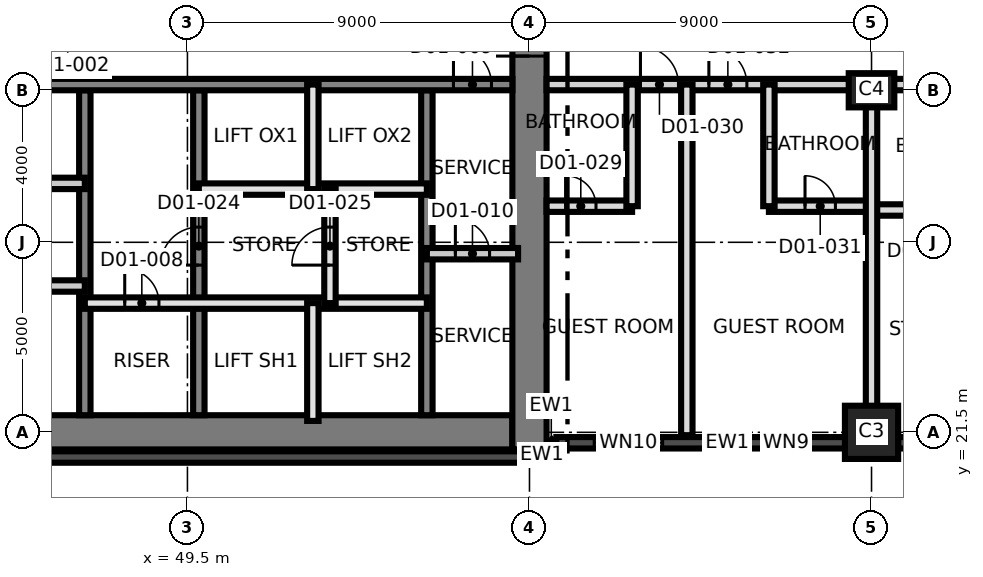
"""IFC4 building model, lengths in metres.
Left out: names, types, materials, properties, quantities, classifications, styles, units other than length and angle.
Written with IfcOpenShell. Run it as: python <this file> out.ifc"""

import sys

from ifc_helpers import new_model, si_unit, direction, frame, frame_2d, origin, origin_2d, place, context, subcontext, project, spatial, rectangle, extrude, element, fill, save


model = new_model("IFC4")
c1 = context("Model", 3, precision=1e-05, world=origin(), true_north=direction((0.0, 1.0)))
c2 = subcontext(c1, "Body", "Model", "MODEL_VIEW")
j1 = project(units=[si_unit("LENGTHUNIT", "METRE"), si_unit("PLANEANGLEUNIT", "RADIAN")], contexts=[c1])
p1 = place(None, origin())
s1 = spatial("IfcSite", under=j1, at=p1, CompositionType="ELEMENT")
p2 = place(p1, origin())
s2 = spatial("IfcBuilding", under=s1, at=p2, CompositionType="ELEMENT")
p3 = place(p2, frame((0.0, 0.0, 33.5)))
s3 = spatial("IfcBuildingStorey", under=s2, at=p3, CompositionType="ELEMENT", Elevation=33.5)
p4 = place(p3, frame((31.05, 21.5, 0.0), z_axis=(0.0, 0.0, 1.0), x_axis=(1.0, 0.0, 0.0)))
e1 = element("IfcWall", 1, at=p4, inside=s3, PredefinedType="SHEAR", context=c2, shape_type="SweptSolid", body=[
    extrude(rectangle(XDim=27.0, YDim=0.9, at=frame_2d((13.5, 0.0))), origin(), (0.0, 0.0, 1.0), 3.7),
])
p5 = place(p3, frame((58.5, 21.05, 0.0), z_axis=(0.0, 0.0, 1.0), x_axis=(0.0, 1.0, 0.0)))
e2 = element("IfcWall", 2, at=p5, inside=s3, PredefinedType="SHEAR", context=c2, shape_type="SweptSolid", body=[
    extrude(rectangle(XDim=18.9, YDim=0.9, at=frame_2d((9.45, 0.0))), origin(), (0.0, 0.0, 1.0), 3.7),
])
p6 = place(p5, frame((10.35, 0.0, 0.0)))
e3 = element("IfcOpeningElement", 3, at=p6, cuts=e2, PredefinedType="OPENING", context=c2, shape_type="SweptSolid", body=[
    extrude(rectangle(XDim=1.2, YDim=2.1, at=frame_2d((0.6, 1.05))), frame((0.0, 0.46, 0.0), z_axis=(0.0, -1.0, 0.0), x_axis=(1.0, 0.0, 0.0)), (0.0, 0.0, 1.0), 0.92),
])
p7 = place(p3, frame((46.8, 21.95, 0.0), z_axis=(0.0, 0.0, 1.0), x_axis=(0.0, 1.0, 0.0)))
e4 = element("IfcWall", 4, at=p7, inside=s3, PredefinedType="SHEAR", context=c2, shape_type="SweptSolid", body=[
    extrude(rectangle(XDim=8.55, YDim=0.3, at=frame_2d((4.275, 0.0))), origin(), (0.0, 0.0, 1.0), 3.7),
])
p8 = place(p3, frame((49.8, 21.95, 0.0), z_axis=(0.0, 0.0, 1.0), x_axis=(0.0, 1.0, 0.0)))
e5 = element("IfcWall", 5, at=p8, inside=s3, PredefinedType="SHEAR", context=c2, shape_type="SweptSolid", body=[
    extrude(rectangle(XDim=8.55, YDim=0.3, at=frame_2d((4.275, 0.0))), origin(), (0.0, 0.0, 1.0), 3.7),
])
p9 = place(p8, frame((3.95, 0.0, 0.0)))
e6 = element("IfcOpeningElement", 6, at=p9, cuts=e5, PredefinedType="OPENING", context=c2, shape_type="SweptSolid", body=[
    extrude(rectangle(XDim=1.0, YDim=2.1, at=frame_2d((0.5, 1.05))), frame((0.0, 0.16, 0.0), z_axis=(0.0, -1.0, 0.0), x_axis=(1.0, 0.0, 0.0)), (0.0, 0.0, 1.0), 0.32),
])
p10 = place(p3, frame((55.8, 21.95, 0.0), z_axis=(0.0, 0.0, 1.0), x_axis=(0.0, 1.0, 0.0)))
e7 = element("IfcWall", 7, at=p10, inside=s3, PredefinedType="SHEAR", context=c2, shape_type="SweptSolid", body=[
    extrude(rectangle(XDim=8.55, YDim=0.3, at=frame_2d((4.275, 0.0))), origin(), (0.0, 0.0, 1.0), 3.7),
])
p11 = place(p3, frame((31.95, 30.65, 0.0), z_axis=(0.0, 0.0, 1.0), x_axis=(1.0, 0.0, 0.0)))
e8 = element("IfcWall", 8, at=p11, inside=s3, PredefinedType="SHEAR", context=c2, shape_type="SweptSolid", body=[
    extrude(rectangle(XDim=26.1, YDim=0.3, at=frame_2d((13.05, 0.0))), origin(), (0.0, 0.0, 1.0), 3.7),
])
p12 = place(p11, frame((24.55, 0.0, 0.0)))
e9 = element("IfcOpeningElement", 9, at=p12, cuts=e8, PredefinedType="OPENING", context=c2, shape_type="SweptSolid", body=[
    extrude(rectangle(XDim=1.0, YDim=2.1, at=frame_2d((0.5, 1.05))), frame((0.0, 0.16, 0.0), z_axis=(0.0, -1.0, 0.0), x_axis=(1.0, 0.0, 0.0)), (0.0, 0.0, 1.0), 0.32),
])
p13 = place(p11, frame((11.35, 0.0, 0.0)))
e10 = element("IfcOpeningElement", 10, at=p13, cuts=e8, PredefinedType="OPENING", context=c2, shape_type="SweptSolid", body=[
    extrude(rectangle(XDim=1.0, YDim=2.1, at=frame_2d((0.5, 1.05))), frame((0.0, 0.16, 0.0), z_axis=(0.0, -1.0, 0.0), x_axis=(1.0, 0.0, 0.0)), (0.0, 0.0, 1.0), 0.32),
])
p14 = place(p3, frame((67.5, 21.5, 0.0), z_axis=(0.0, 0.0, 1.0), x_axis=(1.0, 0.0, 0.0)))
e11 = element("IfcColumn", 11, at=p14, inside=s3, PredefinedType="COLUMN", context=c2, shape_type="SweptSolid", body=[
    extrude(rectangle(XDim=1.4, YDim=1.4, at=origin_2d()), origin(), (0.0, 0.0, 1.0), 3.7),
])
p15 = place(p3, frame((67.5, 30.5, 0.0), z_axis=(0.0, 0.0, 1.0), x_axis=(1.0, 0.0, 0.0)))
e12 = element("IfcColumn", 12, at=p15, inside=s3, PredefinedType="COLUMN", context=c2, shape_type="SweptSolid", body=[
    extrude(rectangle(XDim=1.2, YDim=0.9, at=origin_2d()), origin(), (0.0, 0.0, 1.0), 3.7),
])
p16 = place(p3, frame((31.36, 20.85, 0.0), z_axis=(0.0, 0.0, 1.0), x_axis=(1.0, 0.0, 0.0)))
e13 = element("IfcWall", 13, at=p16, inside=s3, PredefinedType="SOLIDWALL", context=c2, shape_type="SweptSolid", body=[
    extrude(rectangle(XDim=27.281, YDim=0.3, at=frame_2d((13.64, 0.0))), origin(), (0.0, 0.0, 1.0), 3.4),
])
p17 = place(p3, frame((58.698, 20.861, 0.0), z_axis=(0.0, 0.0, 1.0), x_axis=(0.923757413239, 0.38297812142, 0.0)))
e14 = element("IfcWall", 14, at=p17, inside=s3, PredefinedType="SOLIDWALL", context=c2, shape_type="SweptSolid", body=[
    extrude(rectangle(XDim=0.275, YDim=0.3, at=frame_2d((0.138, 0.0))), origin(), (0.0, 0.0, 1.0), 3.4),
])
p18 = place(p3, frame((58.952, 20.967, 0.0), z_axis=(0.0, 0.0, 1.0), x_axis=(0.702144810536, 0.712034174065, 0.0)))
e15 = element("IfcWall", 15, at=p18, inside=s3, PredefinedType="SOLIDWALL", context=c2, shape_type="SweptSolid", body=[
    extrude(rectangle(XDim=0.346, YDim=0.3, at=frame_2d((0.173, 0.0))), origin(), (0.0, 0.0, 1.0), 3.4),
])
p19 = place(p3, frame((59.207, 21.225, 0.0), z_axis=(0.0, 0.0, 1.0), x_axis=(1.0, 0.0, 0.0)))
e16 = element("IfcWall", 16, at=p19, inside=s3, PredefinedType="SOLIDWALL", context=c2, shape_type="SweptSolid", body=[
    extrude(rectangle(XDim=8.993, YDim=0.3, at=frame_2d((4.497, 0.0))), origin(), (0.0, 0.0, 1.0), 3.4),
])
p20 = place(p19, frame((0.997, 0.0, 0.3)))
e17 = element("IfcOpeningElement", 17, at=p20, cuts=e16, PredefinedType="OPENING", context=c2, shape_type="SweptSolid", body=[
    extrude(rectangle(XDim=1.8, YDim=2.4, at=frame_2d((0.9, 1.2))), frame((0.0, 0.16, 0.0), z_axis=(0.0, -1.0, 0.0), x_axis=(1.0, 0.0, 0.0)), (0.0, 0.0, 1.0), 0.32),
])
p21 = place(p19, frame((5.443, 0.0, 0.9)))
e18 = element("IfcOpeningElement", 18, at=p21, cuts=e16, PredefinedType="OPENING", context=c2, shape_type="SweptSolid", body=[
    extrude(rectangle(XDim=1.2, YDim=1.5, at=frame_2d((0.6, 0.75))), frame((0.0, 0.16, 0.0), z_axis=(0.0, -1.0, 0.0), x_axis=(1.0, 0.0, 0.0)), (0.0, 0.0, 1.0), 0.32),
])
p22 = place(p3, frame((68.2, 21.225, 0.0), z_axis=(0.0, 0.0, 1.0), x_axis=(1.0, 0.0, 0.0)))
e19 = element("IfcWall", 19, at=p22, inside=s3, PredefinedType="SOLIDWALL", context=c2, shape_type="SweptSolid", body=[
    extrude(rectangle(XDim=7.6, YDim=0.3, at=frame_2d((3.8, 0.0))), origin(), (0.0, 0.0, 1.0), 2.7),
])
p23 = place(p22, frame((0.95, 0.0, 0.9)))
e20 = element("IfcOpeningElement", 20, at=p23, cuts=e19, PredefinedType="OPENING", context=c2, shape_type="SweptSolid", body=[
    extrude(rectangle(XDim=1.2, YDim=1.5, at=frame_2d((0.6, 0.75))), frame((0.0, 0.16, 0.0), z_axis=(0.0, -1.0, 0.0), x_axis=(1.0, 0.0, 0.0)), (0.0, 0.0, 1.0), 0.32),
])
p24 = place(p22, frame((5.45, 0.0, 0.9)))
e21 = element("IfcOpeningElement", 21, at=p24, cuts=e19, PredefinedType="OPENING", context=c2, shape_type="SweptSolid", body=[
    extrude(rectangle(XDim=1.2, YDim=1.5, at=frame_2d((0.6, 0.75))), frame((0.0, 0.16, 0.0), z_axis=(0.0, -1.0, 0.0), x_axis=(1.0, 0.0, 0.0)), (0.0, 0.0, 1.0), 0.32),
])
p25 = place(p3, frame((46.8, 24.9, 0.0), z_axis=(0.0, 0.0, 1.0), x_axis=(1.0, 0.0, 0.0)))
e22 = element("IfcWall", 22, at=p25, inside=s3, PredefinedType="SOLIDWALL", context=c2, shape_type="SweptSolid", body=[
    extrude(rectangle(XDim=9.0, YDim=0.3, at=frame_2d((4.5, 0.0))), origin(), (0.0, 0.0, 1.0), 3.4),
])
p26 = place(p25, frame((1.05, 0.0, 0.0)))
e23 = element("IfcOpeningElement", 23, at=p26, cuts=e22, PredefinedType="OPENING", context=c2, shape_type="SweptSolid", body=[
    extrude(rectangle(XDim=0.9, YDim=2.1, at=frame_2d((0.45, 1.05))), frame((0.0, 0.16, 0.0), z_axis=(0.0, -1.0, 0.0), x_axis=(1.0, 0.0, 0.0)), (0.0, 0.0, 1.0), 0.32),
])
p27 = place(p3, frame((40.8, 25.35, 0.0), z_axis=(0.0, 0.0, 1.0), x_axis=(1.0, 0.0, 0.0)))
e24 = element("IfcWall", 24, at=p27, inside=s3, PredefinedType="PARTITIONING", context=c2, shape_type="SweptSolid", body=[
    extrude(rectangle(XDim=6.0, YDim=0.3, at=frame_2d((3.0, 0.0))), origin(), (0.0, 0.0, 1.0), 3.4),
])
p28 = place(p27, frame((2.5, 0.0, 0.0)))
e25 = element("IfcOpeningElement", 25, at=p28, cuts=e24, PredefinedType="OPENING", context=c2, shape_type="SweptSolid", body=[
    extrude(rectangle(XDim=1.0, YDim=2.1, at=frame_2d((0.5, 1.05))), frame((0.0, 0.16, 0.0), z_axis=(0.0, -1.0, 0.0), x_axis=(1.0, 0.0, 0.0)), (0.0, 0.0, 1.0), 0.32),
])
p29 = place(p3, frame((55.8, 26.2, 0.0), z_axis=(0.0, 0.0, 1.0), x_axis=(1.0, 0.0, 0.0)))
e26 = element("IfcWall", 26, at=p29, inside=s3, PredefinedType="PARTITIONING", context=c2, shape_type="SweptSolid", body=[
    extrude(rectangle(XDim=2.4, YDim=0.3, at=frame_2d((1.2, 0.0))), origin(), (0.0, 0.0, 1.0), 3.4),
])
p30 = place(p29, frame((0.75, 0.0, 0.0)))
e27 = element("IfcOpeningElement", 27, at=p30, cuts=e26, PredefinedType="OPENING", context=c2, shape_type="SweptSolid", body=[
    extrude(rectangle(XDim=0.9, YDim=2.1, at=frame_2d((0.45, 1.05))), frame((0.0, 0.16, 0.0), z_axis=(0.0, -1.0, 0.0), x_axis=(1.0, 0.0, 0.0)), (0.0, 0.0, 1.0), 0.32),
])
p31 = place(p3, frame((49.8, 27.9, 0.0), z_axis=(0.0, 0.0, 1.0), x_axis=(1.0, 0.0, 0.0)))
e28 = element("IfcWall", 28, at=p31, inside=s3, PredefinedType="SOLIDWALL", context=c2, shape_type="SweptSolid", body=[
    extrude(rectangle(XDim=6.0, YDim=0.3, at=frame_2d((3.0, 0.0))), origin(), (0.0, 0.0, 1.0), 3.4),
])
p32 = place(p3, frame((40.8, 28.05, 0.0), z_axis=(0.0, 0.0, 1.0), x_axis=(1.0, 0.0, 0.0)))
e29 = element("IfcWall", 29, at=p32, inside=s3, PredefinedType="PARTITIONING", context=c2, shape_type="SweptSolid", body=[
    extrude(rectangle(XDim=6.0, YDim=0.3, at=frame_2d((3.0, 0.0))), origin(), (0.0, 0.0, 1.0), 3.4),
])
p33 = place(p3, frame((52.8, 21.8, 0.0), z_axis=(0.0, 0.0, 1.0), x_axis=(0.0, 1.0, 0.0)))
e30 = element("IfcWall", 30, at=p33, inside=s3, PredefinedType="SOLIDWALL", context=c2, shape_type="SweptSolid", body=[
    extrude(rectangle(XDim=3.1, YDim=0.3, at=frame_2d((1.55, 0.0))), origin(), (0.0, 0.0, 1.0), 3.4),
])
p34 = place(p3, frame((52.8, 27.9, 0.0), z_axis=(0.0, 0.0, 1.0), x_axis=(0.0, 1.0, 0.0)))
e31 = element("IfcWall", 31, at=p34, inside=s3, PredefinedType="SOLIDWALL", context=c2, shape_type="SweptSolid", body=[
    extrude(rectangle(XDim=2.75, YDim=0.3, at=frame_2d((1.375, 0.0))), origin(), (0.0, 0.0, 1.0), 3.4),
])
p35 = place(p3, frame((53.25, 24.9, 0.0), z_axis=(0.0, 0.0, 1.0), x_axis=(0.0, 1.0, 0.0)))
e32 = element("IfcWall", 32, at=p35, inside=s3, PredefinedType="SOLIDWALL", context=c2, shape_type="SweptSolid", body=[
    extrude(rectangle(XDim=3.0, YDim=0.3, at=frame_2d((1.5, 0.0))), origin(), (0.0, 0.0, 1.0), 3.4),
])
p36 = place(p35, frame((1.0, 0.0, 0.0)))
e33 = element("IfcOpeningElement", 33, at=p36, cuts=e32, PredefinedType="OPENING", context=c2, shape_type="SweptSolid", body=[
    extrude(rectangle(XDim=1.0, YDim=2.1, at=frame_2d((0.5, 1.05))), frame((0.0, 0.16, 0.0), z_axis=(0.0, -1.0, 0.0), x_axis=(1.0, 0.0, 0.0)), (0.0, 0.0, 1.0), 0.32),
])
p37 = place(p3, frame((67.5, 27.35, 0.0), z_axis=(0.0, 0.0, 1.0), x_axis=(1.0, 0.0, 0.0)))
e34 = element("IfcWall", 34, at=p37, inside=s3, PredefinedType="PARTITIONING", context=c2, shape_type="SweptSolid", body=[
    extrude(rectangle(XDim=3.0, YDim=0.3, at=frame_2d((1.5, 0.0))), origin(), (0.0, 0.0, 1.0), 3.4),
])
p38 = place(p37, frame((1.1, 0.0, 0.0)))
e35 = element("IfcOpeningElement", 35, at=p38, cuts=e34, PredefinedType="OPENING", context=c2, shape_type="SweptSolid", body=[
    extrude(rectangle(XDim=0.8, YDim=2.1, at=frame_2d((0.4, 1.05))), frame((0.0, 0.16, 0.0), z_axis=(0.0, -1.0, 0.0), x_axis=(1.0, 0.0, 0.0)), (0.0, 0.0, 1.0), 0.32),
])
p39 = place(p3, frame((58.95, 27.45, 0.0), z_axis=(0.0, 0.0, 1.0), x_axis=(1.0, 0.0, 0.0)))
e36 = element("IfcWall", 36, at=p39, inside=s3, PredefinedType="PARTITIONING", context=c2, shape_type="SweptSolid", body=[
    extrude(rectangle(XDim=2.25, YDim=0.3, at=frame_2d((1.125, 0.0))), origin(), (0.0, 0.0, 1.0), 3.4),
])
p40 = place(p39, frame((0.5, 0.0, 0.0)))
e37 = element("IfcOpeningElement", 37, at=p40, cuts=e36, PredefinedType="OPENING", context=c2, shape_type="SweptSolid", body=[
    extrude(rectangle(XDim=0.8, YDim=2.1, at=frame_2d((0.4, 1.05))), frame((0.0, 0.16, 0.0), z_axis=(0.0, -1.0, 0.0), x_axis=(1.0, 0.0, 0.0)), (0.0, 0.0, 1.0), 0.32),
])
p41 = place(p3, frame((64.8, 27.45, 0.0), z_axis=(0.0, 0.0, 1.0), x_axis=(1.0, 0.0, 0.0)))
e38 = element("IfcWall", 38, at=p41, inside=s3, PredefinedType="PARTITIONING", context=c2, shape_type="SweptSolid", body=[
    extrude(rectangle(XDim=2.7, YDim=0.3, at=frame_2d((1.35, 0.0))), origin(), (0.0, 0.0, 1.0), 3.4),
])
p42 = place(p41, frame((0.95, 0.0, 0.0)))
e39 = element("IfcOpeningElement", 39, at=p42, cuts=e38, PredefinedType="OPENING", context=c2, shape_type="SweptSolid", body=[
    extrude(rectangle(XDim=0.8, YDim=2.1, at=frame_2d((0.4, 1.05))), frame((0.0, 0.16, 0.0), z_axis=(0.0, -1.0, 0.0), x_axis=(1.0, 0.0, 0.0)), (0.0, 0.0, 1.0), 0.32),
])
p43 = place(p3, frame((58.95, 30.65, 0.0), z_axis=(0.0, 0.0, 1.0), x_axis=(1.0, 0.0, 0.0)))
e40 = element("IfcWall", 40, at=p43, inside=s3, PredefinedType="PARTITIONING", context=c2, shape_type="SweptSolid", body=[
    extrude(rectangle(XDim=26.38, YDim=0.3, at=frame_2d((13.19, 0.0))), origin(), (0.0, 0.0, 1.0), 3.4),
])
p44 = place(p43, frame((2.47, 0.0, 0.0)))
e41 = element("IfcOpeningElement", 41, at=p44, cuts=e40, PredefinedType="OPENING", context=c2, shape_type="SweptSolid", body=[
    extrude(rectangle(XDim=1.0, YDim=2.1, at=frame_2d((0.5, 1.05))), frame((0.0, 0.16, 0.0), z_axis=(0.0, -1.0, 0.0), x_axis=(1.0, 0.0, 0.0)), (0.0, 0.0, 1.0), 0.32),
])
p45 = place(p43, frame((4.27, 0.0, 0.0)))
e42 = element("IfcOpeningElement", 42, at=p45, cuts=e40, PredefinedType="OPENING", context=c2, shape_type="SweptSolid", body=[
    extrude(rectangle(XDim=1.0, YDim=2.1, at=frame_2d((0.5, 1.05))), frame((0.0, 0.16, 0.0), z_axis=(0.0, -1.0, 0.0), x_axis=(1.0, 0.0, 0.0)), (0.0, 0.0, 1.0), 0.32),
])
p46 = place(p43, frame((11.8, 0.0, 0.0)))
e43 = element("IfcOpeningElement", 43, at=p46, cuts=e40, PredefinedType="OPENING", context=c2, shape_type="SweptSolid", body=[
    extrude(rectangle(XDim=1.0, YDim=2.4, at=frame_2d((0.5, 1.2))), frame((0.0, 0.16, 0.0), z_axis=(0.0, -1.0, 0.0), x_axis=(1.0, 0.0, 0.0)), (0.0, 0.0, 1.0), 0.32),
])
p47 = place(p43, frame((13.3, 0.0, 0.0)))
e44 = element("IfcOpeningElement", 44, at=p47, cuts=e40, PredefinedType="OPENING", context=c2, shape_type="SweptSolid", body=[
    extrude(rectangle(XDim=1.0, YDim=2.4, at=frame_2d((0.5, 1.2))), frame((0.0, 0.16, 0.0), z_axis=(0.0, -1.0, 0.0), x_axis=(1.0, 0.0, 0.0)), (0.0, 0.0, 1.0), 0.32),
])
p48 = place(p43, frame((18.685, 0.0, 0.0)))
e45 = element("IfcOpeningElement", 45, at=p48, cuts=e40, PredefinedType="OPENING", context=c2, shape_type="SweptSolid", body=[
    extrude(rectangle(XDim=1.2, YDim=2.1, at=frame_2d((0.6, 1.05))), frame((0.0, 0.16, 0.0), z_axis=(0.0, -1.0, 0.0), x_axis=(1.0, 0.0, 0.0)), (0.0, 0.0, 1.0), 0.32),
])
p49 = place(p43, frame((21.935, 0.0, 0.0)))
e46 = element("IfcOpeningElement", 46, at=p49, cuts=e40, PredefinedType="OPENING", context=c2, shape_type="SweptSolid", body=[
    extrude(rectangle(XDim=1.0, YDim=2.1, at=frame_2d((0.5, 1.05))), frame((0.0, 0.16, 0.0), z_axis=(0.0, -1.0, 0.0), x_axis=(1.0, 0.0, 0.0)), (0.0, 0.0, 1.0), 0.32),
])
p50 = place(p3, frame((61.2, 27.45, 0.0), z_axis=(0.0, 0.0, 1.0), x_axis=(0.0, 1.0, 0.0)))
e47 = element("IfcWall", 47, at=p50, inside=s3, PredefinedType="PARTITIONING", context=c2, shape_type="SweptSolid", body=[
    extrude(rectangle(XDim=3.2, YDim=0.3, at=frame_2d((1.6, 0.0))), origin(), (0.0, 0.0, 1.0), 3.4),
])
p51 = place(p3, frame((62.64, 21.425, 0.0), z_axis=(0.0, 0.0, 1.0), x_axis=(0.0, 1.0, 0.0)))
e48 = element("IfcWall", 48, at=p51, inside=s3, PredefinedType="PARTITIONING", context=c2, shape_type="SweptSolid", body=[
    extrude(rectangle(XDim=9.225, YDim=0.3, at=frame_2d((4.612, 0.0))), origin(), (0.0, 0.0, 1.0), 3.4),
])
p52 = place(p3, frame((64.8, 27.45, 0.0), z_axis=(0.0, 0.0, 1.0), x_axis=(0.0, 1.0, 0.0)))
e49 = element("IfcWall", 49, at=p52, inside=s3, PredefinedType="PARTITIONING", context=c2, shape_type="SweptSolid", body=[
    extrude(rectangle(XDim=3.2, YDim=0.3, at=frame_2d((1.6, 0.0))), origin(), (0.0, 0.0, 1.0), 3.4),
])
p53 = place(p3, frame((67.5, 21.425, 0.0), z_axis=(0.0, 0.0, 1.0), x_axis=(0.0, 1.0, 0.0)))
e50 = element("IfcWall", 50, at=p53, inside=s3, PredefinedType="PARTITIONING", context=c2, shape_type="SweptSolid", body=[
    extrude(rectangle(XDim=9.225, YDim=0.3, at=frame_2d((4.612, 0.0))), origin(), (0.0, 0.0, 1.0), 3.4),
])
p54 = place(p20, origin())
e51 = element("IfcWindow", 51, at=p54, inside=s3, PartitioningType="SINGLE_PANEL", PredefinedType="WINDOW", context=c2, shape_type="SweptSolid", body=[
    extrude(rectangle(XDim=1.8, YDim=2.4, at=frame_2d((0.9, 1.2))), frame((0.0, 0.03, 0.0), z_axis=(0.0, -1.0, 0.0), x_axis=(1.0, 0.0, 0.0)), (0.0, 0.0, 1.0), 0.06),
])
fill(e17, e51)
p55 = place(p21, origin())
e52 = element("IfcWindow", 52, at=p55, inside=s3, PartitioningType="SINGLE_PANEL", PredefinedType="WINDOW", context=c2, shape_type="SweptSolid", body=[
    extrude(rectangle(XDim=1.2, YDim=1.5, at=frame_2d((0.6, 0.75))), frame((0.0, 0.03, 0.0), z_axis=(0.0, -1.0, 0.0), x_axis=(1.0, 0.0, 0.0)), (0.0, 0.0, 1.0), 0.06),
])
fill(e18, e52)
p56 = place(p26, origin())
e53 = element("IfcDoor", 53, at=p56, inside=s3, OperationType="SINGLE_SWING_RIGHT", PredefinedType="DOOR", context=c2, shape_type="SweptSolid", body=[
    extrude(rectangle(XDim=0.9, YDim=2.1, at=frame_2d((0.45, 1.05))), frame((0.0, 0.025, 0.0), z_axis=(0.0, -1.0, 0.0), x_axis=(1.0, 0.0, 0.0)), (0.0, 0.0, 1.0), 0.05),
])
fill(e23, e53)
p57 = place(p12, origin())
e54 = element("IfcDoor", 54, at=p57, inside=s3, OperationType="SINGLE_SWING_LEFT", PredefinedType="DOOR", context=c2, shape_type="SweptSolid", body=[
    extrude(rectangle(XDim=1.0, YDim=2.1, at=frame_2d((0.5, 1.05))), frame((0.0, 0.025, 0.0), z_axis=(0.0, -1.0, 0.0), x_axis=(1.0, 0.0, 0.0)), (0.0, 0.0, 1.0), 0.05),
])
fill(e9, e54)
p58 = place(p30, origin())
e55 = element("IfcDoor", 55, at=p58, inside=s3, OperationType="SINGLE_SWING_RIGHT", PredefinedType="DOOR", context=c2, shape_type="SweptSolid", body=[
    extrude(rectangle(XDim=0.9, YDim=2.1, at=frame_2d((0.45, 1.05))), frame((0.0, 0.025, 0.0), z_axis=(0.0, -1.0, 0.0), x_axis=(1.0, 0.0, 0.0)), (0.0, 0.0, 1.0), 0.05),
])
fill(e27, e55)
p59 = place(p6, origin())
e56 = element("IfcDoor", 56, at=p59, inside=s3, OperationType="SINGLE_SWING_LEFT", PredefinedType="DOOR", context=c2, shape_type="SweptSolid", body=[
    extrude(rectangle(XDim=1.2, YDim=2.1, at=frame_2d((0.6, 1.05))), frame((0.0, 0.025, 0.0), z_axis=(0.0, -1.0, 0.0), x_axis=(1.0, 0.0, 0.0)), (0.0, 0.0, 1.0), 0.05),
])
fill(e3, e56)
p60 = place(p9, origin())
e57 = element("IfcDoor", 57, at=p60, inside=s3, OperationType="SINGLE_SWING_RIGHT", PredefinedType="DOOR", context=c2, shape_type="SweptSolid", body=[
    extrude(rectangle(XDim=1.0, YDim=2.1, at=frame_2d((0.5, 1.05))), frame((0.0, 0.025, 0.0), z_axis=(0.0, -1.0, 0.0), x_axis=(1.0, 0.0, 0.0)), (0.0, 0.0, 1.0), 0.05),
])
fill(e6, e57)
p61 = place(p36, origin())
e58 = element("IfcDoor", 58, at=p61, inside=s3, OperationType="SINGLE_SWING_RIGHT", PredefinedType="DOOR", context=c2, shape_type="SweptSolid", body=[
    extrude(rectangle(XDim=1.0, YDim=2.1, at=frame_2d((0.5, 1.05))), frame((0.0, 0.025, 0.0), z_axis=(0.0, -1.0, 0.0), x_axis=(1.0, 0.0, 0.0)), (0.0, 0.0, 1.0), 0.05),
])
fill(e33, e58)
p62 = place(p40, origin())
e59 = element("IfcDoor", 59, at=p62, inside=s3, OperationType="SINGLE_SWING_LEFT", PredefinedType="DOOR", context=c2, shape_type="SweptSolid", body=[
    extrude(rectangle(XDim=0.8, YDim=2.1, at=frame_2d((0.4, 1.05))), frame((0.0, 0.025, 0.0), z_axis=(0.0, -1.0, 0.0), x_axis=(1.0, 0.0, 0.0)), (0.0, 0.0, 1.0), 0.05),
])
fill(e37, e59)
p63 = place(p44, origin())
e60 = element("IfcDoor", 60, at=p63, inside=s3, OperationType="SINGLE_SWING_RIGHT", PredefinedType="DOOR", context=c2, shape_type="SweptSolid", body=[
    extrude(rectangle(XDim=1.0, YDim=2.1, at=frame_2d((0.5, 1.05))), frame((0.0, 0.025, 0.0), z_axis=(0.0, -1.0, 0.0), x_axis=(1.0, 0.0, 0.0)), (0.0, 0.0, 1.0), 0.05),
])
fill(e41, e60)
p64 = place(p42, origin())
e61 = element("IfcDoor", 61, at=p64, inside=s3, OperationType="SINGLE_SWING_RIGHT", PredefinedType="DOOR", context=c2, shape_type="SweptSolid", body=[
    extrude(rectangle(XDim=0.8, YDim=2.1, at=frame_2d((0.4, 1.05))), frame((0.0, 0.025, 0.0), z_axis=(0.0, -1.0, 0.0), x_axis=(1.0, 0.0, 0.0)), (0.0, 0.0, 1.0), 0.05),
])
fill(e39, e61)
p65 = place(p45, origin())
e62 = element("IfcDoor", 62, at=p65, inside=s3, OperationType="SINGLE_SWING_LEFT", PredefinedType="DOOR", context=c2, shape_type="SweptSolid", body=[
    extrude(rectangle(XDim=1.0, YDim=2.1, at=frame_2d((0.5, 1.05))), frame((0.0, 0.025, 0.0), z_axis=(0.0, -1.0, 0.0), x_axis=(1.0, 0.0, 0.0)), (0.0, 0.0, 1.0), 0.05),
])
fill(e42, e62)
save(model, sys.argv[1])
